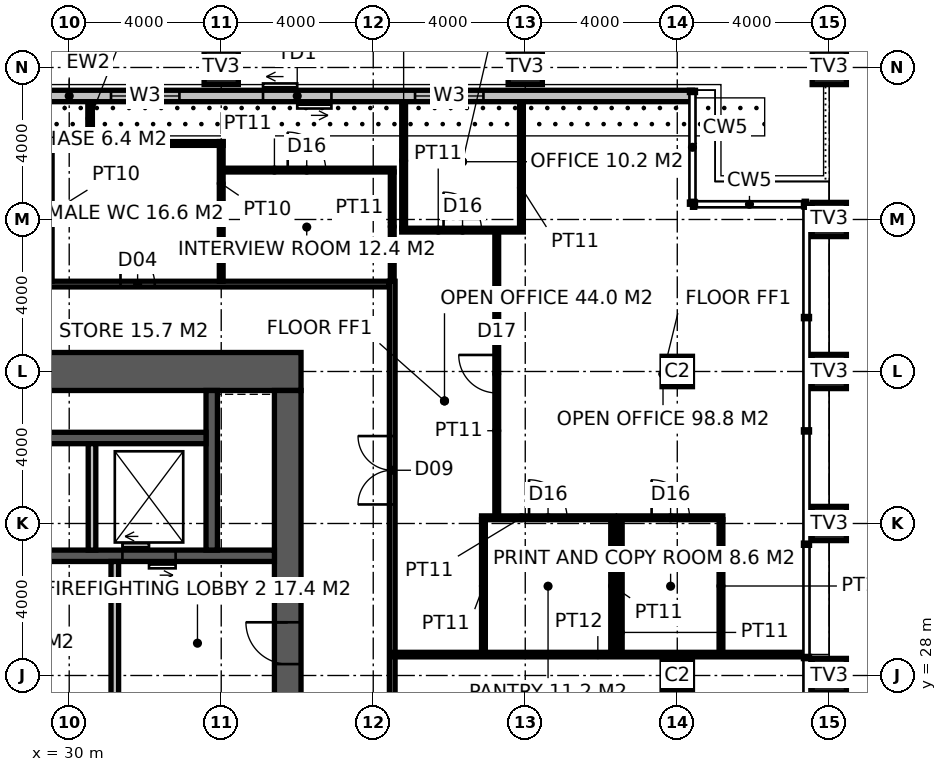
"""IFC4 building model, lengths in metres.
Left out: names, types, materials, properties, quantities, classifications, styles, units other than length and angle.
Written with IfcOpenShell. Run it as: python <this file> out.ifc"""

import sys

from ifc_helpers import new_model, si_unit, direction, frame, frame_2d, origin, origin_2d, place, context, subcontext, project, spatial, rectangle, hollow_rectangle, extrude, element, fill, save


model = new_model("IFC4")
c1 = context("Model", 3, precision=1e-05, world=origin(), true_north=direction((0.0, 1.0)))
c2 = subcontext(c1, "Body", "Model", "MODEL_VIEW")
j1 = project(units=[si_unit("LENGTHUNIT", "METRE"), si_unit("PLANEANGLEUNIT", "RADIAN")], contexts=[c1])
p1 = place(None, origin())
s1 = spatial("IfcSite", under=j1, at=p1, CompositionType="ELEMENT")
p2 = place(p1, origin())
s2 = spatial("IfcBuilding", under=s1, at=p2, CompositionType="ELEMENT")
p3 = place(p2, frame((0.0, 0.0, 238.2)))
s3 = spatial("IfcBuildingStorey", under=s2, at=p3, CompositionType="ELEMENT", Elevation=238.2)
for number, where, z_axis, x_axis in (
    (1, (34.0, 44.0, 0.0), (0.0, 0.0, 1.0), (1.0, 0.0, 0.0)),
    (2, (42.0, 44.0, 0.0), (0.0, 0.0, 1.0), (1.0, 0.0, 0.0)),
    (3, (50.0, 28.0, 0.0), (0.0, 0.0, 1.0), (1.0, 0.0, 0.0)),
    (4, (50.0, 32.0, 0.0), (0.0, 0.0, 1.0), (1.0, 0.0, 0.0)),
    (5, (50.0, 36.0, 0.0), (0.0, 0.0, 1.0), (1.0, 0.0, 0.0)),
    (6, (50.0, 40.0, 0.0), (0.0, 0.0, 1.0), (1.0, 0.0, 0.0)),
    (7, (50.0, 44.0, 0.0), (0.0, 0.0, 1.0), (1.0, 0.0, 0.0)),
):
    element("IfcColumn", number, at=place(p3, frame(where, z_axis=z_axis, x_axis=x_axis)), inside=s3, PredefinedType="USERDEFINED", context=c2, shape_type="SweptSolid", body=[
        extrude(hollow_rectangle(XDim=0.9, YDim=0.9, WallThickness=0.08, at=origin_2d()), origin(), (0.0, 0.0, 1.0), 4.0),
    ])
for number, where, z_axis, x_axis in (
    (8, (46.0, 28.0, 0.0), (0.0, 0.0, 1.0), (1.0, 0.0, 0.0)),
    (9, (46.0, 36.0, 0.0), (0.0, 0.0, 1.0), (1.0, 0.0, 0.0)),
):
    element("IfcColumn", number, at=place(p3, frame(where, z_axis=z_axis, x_axis=x_axis)), inside=s3, PredefinedType="COLUMN", context=c2, shape_type="SweptSolid", body=[
        extrude(hollow_rectangle(XDim=0.8, YDim=0.8, WallThickness=0.08, at=origin_2d()), origin(), (0.0, 0.0, 1.0), 4.0),
    ])
p4 = place(p3, frame((18.5, 36.0, -0.15), z_axis=(0.0, 0.0, 1.0), x_axis=(1.0, 0.0, 0.0)))
e10 = element("IfcWall", 10, at=p4, inside=s3, PredefinedType="SHEAR", context=c2, shape_type="SweptSolid", body=[
    extrude(rectangle(XDim=17.6, YDim=1.0, at=frame_2d((8.8, 0.0))), origin(), (0.0, 0.0, 1.0), 4.0),
])
p5 = place(p3, frame((35.75, 18.5, -0.15), z_axis=(0.0, 0.0, 1.0), x_axis=(0.0, 1.0, 0.0)))
e11 = element("IfcWall", 11, at=p5, inside=s3, PredefinedType="SHEAR", context=c2, shape_type="SweptSolid", body=[
    extrude(rectangle(XDim=17.0, YDim=0.7, at=frame_2d((8.5, 0.0))), origin(), (0.0, 0.0, 1.0), 4.0),
])
p6 = place(p5, frame((9.8, 0.0, 0.15)))
e12 = element("IfcOpeningElement", 12, at=p6, cuts=e11, PredefinedType="OPENING", context=c2, shape_type="SweptSolid", body=[
    extrude(rectangle(XDim=1.1, YDim=2.2, at=frame_2d((0.55, 1.1))), frame((0.0, 0.36, 0.0), z_axis=(0.0, -1.0, 0.0), x_axis=(1.0, 0.0, 0.0)), (0.0, 0.0, 1.0), 0.72),
])
p7 = place(p3, frame((24.15, 31.15, -0.15), z_axis=(0.0, 0.0, 1.0), x_axis=(1.0, 0.0, 0.0)))
e13 = element("IfcWall", 13, at=p7, inside=s3, PredefinedType="SHEAR", context=c2, shape_type="SweptSolid", body=[
    extrude(rectangle(XDim=11.25, YDim=0.3, at=frame_2d((5.625, 0.0))), origin(), (0.0, 0.0, 1.0), 4.0),
])
p8 = place(p7, frame((3.15, 0.0, 0.15)))
e14 = element("IfcOpeningElement", 14, at=p8, cuts=e13, PredefinedType="OPENING", context=c2, shape_type="SweptSolid", body=[
    extrude(rectangle(XDim=1.0, YDim=2.2, at=frame_2d((0.5, 1.1))), frame((0.0, 0.16, 0.0), z_axis=(0.0, -1.0, 0.0), x_axis=(1.0, 0.0, 0.0)), (0.0, 0.0, 1.0), 0.32),
])
p9 = place(p7, frame((7.25, 0.0, 0.15)))
e15 = element("IfcOpeningElement", 15, at=p9, cuts=e13, PredefinedType="OPENING", context=c2, shape_type="SweptSolid", body=[
    extrude(rectangle(XDim=1.4, YDim=2.4, at=frame_2d((0.7, 1.2))), frame((0.0, 0.16, 0.0), z_axis=(0.0, -1.0, 0.0), x_axis=(1.0, 0.0, 0.0)), (0.0, 0.0, 1.0), 0.32),
])
p10 = place(p3, frame((33.75, 31.3, -0.15), z_axis=(0.0, 0.0, 1.0), x_axis=(0.0, 1.0, 0.0)))
e16 = element("IfcWall", 16, at=p10, inside=s3, PredefinedType="SHEAR", context=c2, shape_type="SweptSolid", body=[
    extrude(rectangle(XDim=4.2, YDim=0.3, at=frame_2d((2.1, 0.0))), origin(), (0.0, 0.0, 1.0), 4.0),
])
p11 = place(p3, frame((25.0, 34.25, -0.15), z_axis=(0.0, 0.0, 1.0), x_axis=(1.0, 0.0, 0.0)))
e17 = element("IfcWall", 17, at=p11, inside=s3, PredefinedType="SHEAR", context=c2, shape_type="SweptSolid", body=[
    extrude(rectangle(XDim=8.6, YDim=0.3, at=frame_2d((4.3, 0.0))), origin(), (0.0, 0.0, 1.0), 4.0),
])
p12 = place(p3, frame((30.6, 31.3, -0.15), z_axis=(0.0, 0.0, 1.0), x_axis=(0.0, 1.0, 0.0)))
e18 = element("IfcWall", 18, at=p12, inside=s3, PredefinedType="SOLIDWALL", context=c2, shape_type="SweptSolid", body=[
    extrude(rectangle(XDim=2.8, YDim=0.2, at=frame_2d((1.4, 0.0))), origin(), (0.0, 0.0, 1.0), 4.0),
])
p13 = place(p3, frame((31.2, 26.7, 0.0), z_axis=(0.0, 0.0, 1.0), x_axis=(0.0, 1.0, 0.0)))
e19 = element("IfcWall", 19, at=p13, inside=s3, PredefinedType="SOLIDWALL", context=c2, shape_type="SweptSolid", body=[
    extrude(rectangle(XDim=4.3, YDim=0.2, at=frame_2d((2.15, 0.0))), origin(), (0.0, 0.0, 1.0), 3.85),
])
p14 = place(p3, frame((38.5, 15.025, 0.0), z_axis=(0.0, 0.0, 1.0), x_axis=(0.0, 1.0, 0.0)))
e20 = element("IfcWall", 20, at=p14, inside=s3, PredefinedType="PARTITIONING", context=c2, shape_type="SweptSolid", body=[
    extrude(rectangle(XDim=23.35, YDim=0.15, at=frame_2d((11.675, 0.0))), origin(), (0.0, 0.0, 1.0), 2.65),
])
p15 = place(p14, frame((3.374, 0.0, 0.0)))
e21 = element("IfcOpeningElement", 21, at=p15, cuts=e20, PredefinedType="OPENING", context=c2, shape_type="SweptSolid", body=[
    extrude(rectangle(XDim=1.8, YDim=2.4, at=frame_2d((0.9, 1.2))), frame((0.0, 0.085, 0.0), z_axis=(0.0, -1.0, 0.0), x_axis=(1.0, 0.0, 0.0)), (0.0, 0.0, 1.0), 0.17),
])
p16 = place(p14, frame((17.476, 0.0, 0.0)))
e22 = element("IfcOpeningElement", 22, at=p16, cuts=e20, PredefinedType="OPENING", context=c2, shape_type="SweptSolid", body=[
    extrude(rectangle(XDim=1.8, YDim=2.4, at=frame_2d((0.9, 1.2))), frame((0.0, 0.085, 0.0), z_axis=(0.0, -1.0, 0.0), x_axis=(1.0, 0.0, 0.0)), (0.0, 0.0, 1.0), 0.17),
])
p17 = place(p14, frame((10.475, 0.0, 0.0)))
e23 = element("IfcOpeningElement", 23, at=p17, cuts=e20, PredefinedType="OPENING", context=c2, shape_type="SweptSolid", body=[
    extrude(rectangle(XDim=1.0, YDim=2.2, at=frame_2d((0.5, 1.1))), frame((0.0, 0.085, 0.0), z_axis=(0.0, -1.0, 0.0), x_axis=(1.0, 0.0, 0.0)), (0.0, 0.0, 1.0), 0.17),
])
p18 = place(p3, frame((15.775, 38.3, 0.0), z_axis=(0.0, 0.0, 1.0), x_axis=(1.0, 0.0, 0.0)))
e24 = element("IfcWall", 24, at=p18, inside=s3, PredefinedType="PARTITIONING", context=c2, shape_type="SweptSolid", body=[
    extrude(rectangle(XDim=22.65, YDim=0.15, at=frame_2d((11.325, 0.0))), origin(), (0.0, 0.0, 1.0), 3.85),
])
p19 = place(p18, frame((7.975, 0.0, 0.0)))
e25 = element("IfcOpeningElement", 25, at=p19, cuts=e24, PredefinedType="OPENING", context=c2, shape_type="SweptSolid", body=[
    extrude(rectangle(XDim=0.9, YDim=2.1, at=frame_2d((0.45, 1.05))), frame((0.0, 0.085, 0.0), z_axis=(0.0, -1.0, 0.0), x_axis=(1.0, 0.0, 0.0)), (0.0, 0.0, 1.0), 0.17),
])
p20 = place(p18, frame((11.725, 0.0, 0.0)))
e26 = element("IfcOpeningElement", 26, at=p20, cuts=e24, PredefinedType="OPENING", context=c2, shape_type="SweptSolid", body=[
    extrude(rectangle(XDim=1.0, YDim=2.1, at=frame_2d((0.5, 1.05))), frame((0.0, 0.085, 0.0), z_axis=(0.0, -1.0, 0.0), x_axis=(1.0, 0.0, 0.0)), (0.0, 0.0, 1.0), 0.17),
])
p21 = place(p18, frame((15.575, 0.0, 0.0)))
e27 = element("IfcOpeningElement", 27, at=p21, cuts=e24, PredefinedType="OPENING", context=c2, shape_type="SweptSolid", body=[
    extrude(rectangle(XDim=0.9, YDim=2.1, at=frame_2d((0.45, 1.05))), frame((0.0, 0.085, 0.0), z_axis=(0.0, -1.0, 0.0), x_axis=(1.0, 0.0, 0.0)), (0.0, 0.0, 1.0), 0.17),
])
p22 = place(p3, frame((34.0, 38.375, 0.0), z_axis=(0.0, 0.0, 1.0), x_axis=(0.0, 1.0, 0.0)))
e28 = element("IfcWall", 28, at=p22, inside=s3, PredefinedType="PARTITIONING", context=c2, shape_type="SweptSolid", body=[
    extrude(rectangle(XDim=3.675, YDim=0.1, at=frame_2d((1.837, 0.0))), origin(), (0.0, 0.0, 1.0), 2.65),
])
p23 = place(p3, frame((21.95, 42.0, 0.0), z_axis=(0.0, 0.0, 1.0), x_axis=(1.0, 0.0, 0.0)))
e29 = element("IfcWall", 29, at=p23, inside=s3, PredefinedType="PARTITIONING", context=c2, shape_type="SweptSolid", body=[
    extrude(rectangle(XDim=12.1, YDim=0.1, at=frame_2d((6.05, 0.0))), origin(), (0.0, 0.0, 1.0), 3.85),
])
p24 = place(p3, frame((38.5, 28.55, 0.0), z_axis=(0.0, 0.0, 1.0), x_axis=(1.0, 0.0, 0.0)))
e30 = element("IfcWall", 30, at=p24, inside=s3, PredefinedType="PARTITIONING", context=c2, shape_type="SweptSolid", body=[
    extrude(rectangle(XDim=10.82, YDim=0.12, at=frame_2d((5.41, 0.0))), origin(), (0.0, 0.0, 1.0), 2.65),
])
p25 = place(p3, frame((30.55, 42.0, 0.0), z_axis=(0.0, 0.0, 1.0), x_axis=(0.0, 1.0, 0.0)))
e31 = element("IfcWall", 31, at=p25, inside=s3, PredefinedType="PARTITIONING", context=c2, shape_type="SweptSolid", body=[
    extrude(rectangle(XDim=1.32, YDim=0.12, at=frame_2d((0.66, 0.0))), origin(), (0.0, 0.0, 1.0), 2.65),
])
p26 = place(p3, frame((40.85, 32.15, 0.0), z_axis=(0.0, 0.0, 1.0), x_axis=(1.0, 0.0, 0.0)))
e32 = element("IfcWall", 32, at=p26, inside=s3, PredefinedType="PARTITIONING", context=c2, shape_type="SweptSolid", body=[
    extrude(rectangle(XDim=3.5, YDim=0.1, at=frame_2d((1.75, 0.0))), origin(), (0.0, 0.0, 1.0), 2.95),
])
p27 = place(p26, frame((1.25, 0.0, 0.0)))
e33 = element("IfcOpeningElement", 33, at=p27, cuts=e32, PredefinedType="OPENING", context=c2, shape_type="SweptSolid", body=[
    extrude(rectangle(XDim=1.0, YDim=2.2, at=frame_2d((0.5, 1.1))), frame((0.0, 0.06, 0.0), z_axis=(0.0, -1.0, 0.0), x_axis=(1.0, 0.0, 0.0)), (0.0, 0.0, 1.0), 0.12),
])
p28 = place(p3, frame((44.45, 32.15, 0.0), z_axis=(0.0, 0.0, 1.0), x_axis=(1.0, 0.0, 0.0)))
e34 = element("IfcWall", 34, at=p28, inside=s3, PredefinedType="PARTITIONING", context=c2, shape_type="SweptSolid", body=[
    extrude(rectangle(XDim=2.75, YDim=0.1, at=frame_2d((1.375, 0.0))), origin(), (0.0, 0.0, 1.0), 2.95),
])
p29 = place(p28, frame((0.875, 0.0, 0.0)))
e35 = element("IfcOpeningElement", 35, at=p29, cuts=e34, PredefinedType="OPENING", context=c2, shape_type="SweptSolid", body=[
    extrude(rectangle(XDim=1.0, YDim=2.2, at=frame_2d((0.5, 1.1))), frame((0.0, 0.06, 0.0), z_axis=(0.0, -1.0, 0.0), x_axis=(1.0, 0.0, 0.0)), (0.0, 0.0, 1.0), 0.12),
])
p30 = place(p3, frame((38.75, 39.72, 0.0), z_axis=(0.0, 0.0, 1.0), x_axis=(1.0, 0.0, 0.0)))
e36 = element("IfcWall", 36, at=p30, inside=s3, PredefinedType="PARTITIONING", context=c2, shape_type="SweptSolid", body=[
    extrude(rectangle(XDim=3.2, YDim=0.1, at=frame_2d((1.6, 0.0))), origin(), (0.0, 0.0, 1.0), 3.85),
])
p31 = place(p30, frame((1.1, 0.0, 0.0)))
e37 = element("IfcOpeningElement", 37, at=p31, cuts=e36, PredefinedType="OPENING", context=c2, shape_type="SweptSolid", body=[
    extrude(rectangle(XDim=1.0, YDim=2.2, at=frame_2d((0.5, 1.1))), frame((0.0, 0.06, 0.0), z_axis=(0.0, -1.0, 0.0), x_axis=(1.0, 0.0, 0.0)), (0.0, 0.0, 1.0), 0.12),
])
p32 = place(p3, frame((34.05, 41.3, 0.0), z_axis=(0.0, 0.0, 1.0), x_axis=(1.0, 0.0, 0.0)))
e38 = element("IfcWall", 38, at=p32, inside=s3, PredefinedType="PARTITIONING", context=c2, shape_type="SweptSolid", body=[
    extrude(rectangle(XDim=4.5, YDim=0.1, at=frame_2d((2.25, 0.0))), origin(), (0.0, 0.0, 1.0), 3.85),
])
p33 = place(p32, frame((1.7, 0.0, 0.0)))
e39 = element("IfcOpeningElement", 39, at=p33, cuts=e38, PredefinedType="OPENING", context=c2, shape_type="SweptSolid", body=[
    extrude(rectangle(XDim=1.0, YDim=2.2, at=frame_2d((0.5, 1.1))), frame((0.0, 0.06, 0.0), z_axis=(0.0, -1.0, 0.0), x_axis=(1.0, 0.0, 0.0)), (0.0, 0.0, 1.0), 0.12),
])
p34 = place(p3, frame((38.5, 38.375, 0.0), z_axis=(0.0, 0.0, 1.0), x_axis=(0.0, 1.0, 0.0)))
e40 = element("IfcWall", 40, at=p34, inside=s3, PredefinedType="PARTITIONING", context=c2, shape_type="SweptSolid", body=[
    extrude(rectangle(XDim=2.875, YDim=0.1, at=frame_2d((1.438, 0.0))), origin(), (0.0, 0.0, 1.0), 2.65),
])
p35 = place(p3, frame((38.8, 39.77, 0.0), z_axis=(0.0, 0.0, 1.0), x_axis=(0.0, 1.0, 0.0)))
e41 = element("IfcWall", 41, at=p35, inside=s3, PredefinedType="PARTITIONING", context=c2, shape_type="SweptSolid", body=[
    extrude(rectangle(XDim=3.55, YDim=0.1, at=frame_2d((1.775, 0.0))), origin(), (0.0, 0.0, 1.0), 3.85),
])
p36 = place(p3, frame((40.9, 28.61, 0.0), z_axis=(0.0, 0.0, 1.0), x_axis=(0.0, 1.0, 0.0)))
e42 = element("IfcWall", 42, at=p36, inside=s3, PredefinedType="PARTITIONING", context=c2, shape_type="SweptSolid", body=[
    extrude(rectangle(XDim=3.49, YDim=0.1, at=frame_2d((1.745, 0.0))), origin(), (0.0, 0.0, 1.0), 3.85),
])
p37 = place(p3, frame((41.9, 39.77, 0.0), z_axis=(0.0, 0.0, 1.0), x_axis=(0.0, 1.0, 0.0)))
e43 = element("IfcWall", 43, at=p37, inside=s3, PredefinedType="PARTITIONING", context=c2, shape_type="SweptSolid", body=[
    extrude(rectangle(XDim=3.55, YDim=0.1, at=frame_2d((1.775, 0.0))), origin(), (0.0, 0.0, 1.0), 2.65),
])
for number, where, z_axis, x_axis in (
    (44, (44.3, 28.61, 0.0), (0.0, 0.0, 1.0), (0.0, 1.0, 0.0)),
    (45, (44.5, 28.61, 0.0), (0.0, 0.0, 1.0), (0.0, 1.0, 0.0)),
    (46, (47.15, 28.61, 0.0), (0.0, 0.0, 1.0), (0.0, 1.0, 0.0)),
):
    element("IfcWall", number, at=place(p3, frame(where, z_axis=z_axis, x_axis=x_axis)), inside=s3, PredefinedType="PARTITIONING", context=c2, shape_type="SweptSolid", body=[
        extrude(rectangle(XDim=3.49, YDim=0.1, at=frame_2d((1.745, 0.0))), origin(), (0.0, 0.0, 1.0), 3.85),
    ])
p38 = place(p3, frame((41.25, 32.2, 0.0), z_axis=(0.0, 0.0, 1.0), x_axis=(0.0, 1.0, 0.0)))
e47 = element("IfcWall", 47, at=p38, inside=s3, PredefinedType="PARTITIONING", context=c2, shape_type="SweptSolid", body=[
    extrude(rectangle(XDim=7.47, YDim=0.1, at=frame_2d((3.735, 0.0))), origin(), (0.0, 0.0, 1.0), 3.85),
])
p39 = place(p38, frame((3.235, 0.0, 0.0)))
e48 = element("IfcOpeningElement", 48, at=p39, cuts=e47, PredefinedType="OPENING", context=c2, shape_type="SweptSolid", body=[
    extrude(rectangle(XDim=1.0, YDim=2.2, at=frame_2d((0.5, 1.1))), frame((0.0, 0.06, 0.0), z_axis=(0.0, -1.0, 0.0), x_axis=(1.0, 0.0, 0.0)), (0.0, 0.0, 1.0), 0.12),
])
p40 = place(p3, frame((46.4, 43.25, 0.0), z_axis=(0.0, 0.0, 1.0), x_axis=(-1.0, 0.0, 0.0)))
e49 = element("IfcWall", 49, at=p40, inside=s3, PredefinedType="ELEMENTEDWALL", context=c2, shape_type="SweptSolid", body=[
    extrude(rectangle(XDim=32.8, YDim=0.3, at=frame_2d((16.4, 0.0))), origin(), (0.0, 0.0, 1.0), 3.85),
])
p41 = place(p40, frame((25.5, 0.0, 0.8)))
e50 = element("IfcOpeningElement", 50, at=p41, cuts=e49, PredefinedType="OPENING", context=c2, shape_type="SweptSolid", body=[
    extrude(rectangle(XDim=1.8, YDim=2.4, at=frame_2d((0.9, 1.2))), frame((0.0, 0.16, 0.0), z_axis=(0.0, -1.0, 0.0), x_axis=(1.0, 0.0, 0.0)), (0.0, 0.0, 1.0), 0.32),
])
p42 = place(p40, frame((21.5, 0.0, 0.8)))
e51 = element("IfcOpeningElement", 51, at=p42, cuts=e49, PredefinedType="OPENING", context=c2, shape_type="SweptSolid", body=[
    extrude(rectangle(XDim=1.8, YDim=2.4, at=frame_2d((0.9, 1.2))), frame((0.0, 0.16, 0.0), z_axis=(0.0, -1.0, 0.0), x_axis=(1.0, 0.0, 0.0)), (0.0, 0.0, 1.0), 0.32),
])
p43 = place(p40, frame((18.6, 0.0, 0.8)))
e52 = element("IfcOpeningElement", 52, at=p43, cuts=e49, PredefinedType="OPENING", context=c2, shape_type="SweptSolid", body=[
    extrude(rectangle(XDim=1.0, YDim=2.4, at=frame_2d((0.5, 1.2))), frame((0.0, 0.16, 0.0), z_axis=(0.0, -1.0, 0.0), x_axis=(1.0, 0.0, 0.0)), (0.0, 0.0, 1.0), 0.32),
])
p44 = place(p40, frame((17.2, 0.0, 0.8)))
e53 = element("IfcOpeningElement", 53, at=p44, cuts=e49, PredefinedType="OPENING", context=c2, shape_type="SweptSolid", body=[
    extrude(rectangle(XDim=1.0, YDim=2.4, at=frame_2d((0.5, 1.2))), frame((0.0, 0.16, 0.0), z_axis=(0.0, -1.0, 0.0), x_axis=(1.0, 0.0, 0.0)), (0.0, 0.0, 1.0), 0.32),
])
p45 = place(p40, frame((13.5, 0.0, 0.8)))
e54 = element("IfcOpeningElement", 54, at=p45, cuts=e49, PredefinedType="OPENING", context=c2, shape_type="SweptSolid", body=[
    extrude(rectangle(XDim=1.8, YDim=2.4, at=frame_2d((0.9, 1.2))), frame((0.0, 0.16, 0.0), z_axis=(0.0, -1.0, 0.0), x_axis=(1.0, 0.0, 0.0)), (0.0, 0.0, 1.0), 0.32),
])
p46 = place(p40, frame((9.5, 0.0, 0.0)))
e55 = element("IfcOpeningElement", 55, at=p46, cuts=e49, PredefinedType="OPENING", context=c2, shape_type="SweptSolid", body=[
    extrude(rectangle(XDim=1.8, YDim=2.4, at=frame_2d((0.9, 1.2))), frame((0.0, 0.16, 0.0), z_axis=(0.0, -1.0, 0.0), x_axis=(1.0, 0.0, 0.0)), (0.0, 0.0, 1.0), 0.32),
])
p47 = place(p40, frame((5.5, 0.0, 0.8)))
e56 = element("IfcOpeningElement", 56, at=p47, cuts=e49, PredefinedType="OPENING", context=c2, shape_type="SweptSolid", body=[
    extrude(rectangle(XDim=1.8, YDim=2.4, at=frame_2d((0.9, 1.2))), frame((0.0, 0.16, 0.0), z_axis=(0.0, -1.0, 0.0), x_axis=(1.0, 0.0, 0.0)), (0.0, 0.0, 1.0), 0.32),
])
p48 = place(p6, origin())
e57 = element("IfcDoor", 57, at=p48, inside=s3, OperationType="SINGLE_SWING_RIGHT", PredefinedType="DOOR", context=c2, shape_type="SweptSolid", body=[
    extrude(rectangle(XDim=1.1, YDim=2.2, at=frame_2d((0.55, 1.1))), frame((0.0, 0.025, 0.0), z_axis=(0.0, -1.0, 0.0), x_axis=(1.0, 0.0, 0.0)), (0.0, 0.0, 1.0), 0.05),
])
fill(e12, e57)
p49 = place(p21, origin())
e58 = element("IfcDoor", 58, at=p49, inside=s3, OperationType="SINGLE_SWING_LEFT", PredefinedType="DOOR", context=c2, shape_type="SweptSolid", body=[
    extrude(rectangle(XDim=0.9, YDim=2.1, at=frame_2d((0.45, 1.05))), frame((0.0, 0.025, 0.0), z_axis=(0.0, -1.0, 0.0), x_axis=(1.0, 0.0, 0.0)), (0.0, 0.0, 1.0), 0.05),
])
fill(e27, e58)
p50 = place(p16, origin())
e59 = element("IfcDoor", 59, at=p50, inside=s3, OperationType="DOUBLE_DOOR_DOUBLE_SWING", PredefinedType="DOOR", context=c2, shape_type="SweptSolid", body=[
    extrude(rectangle(XDim=1.8, YDim=2.4, at=frame_2d((0.9, 1.2))), frame((0.0, 0.025, 0.0), z_axis=(0.0, -1.0, 0.0), x_axis=(1.0, 0.0, 0.0)), (0.0, 0.0, 1.0), 0.05),
])
fill(e22, e59)
p51 = place(p33, origin())
e60 = element("IfcDoor", 60, at=p51, inside=s3, OperationType="SINGLE_SWING_LEFT", PredefinedType="DOOR", context=c2, shape_type="SweptSolid", body=[
    extrude(rectangle(XDim=1.0, YDim=2.2, at=frame_2d((0.5, 1.1))), frame((0.0, 0.025, 0.0), z_axis=(0.0, -1.0, 0.0), x_axis=(1.0, 0.0, 0.0)), (0.0, 0.0, 1.0), 0.05),
])
fill(e39, e60)
p52 = place(p27, origin())
e61 = element("IfcDoor", 61, at=p52, inside=s3, OperationType="SINGLE_SWING_LEFT", PredefinedType="DOOR", context=c2, shape_type="SweptSolid", body=[
    extrude(rectangle(XDim=1.0, YDim=2.2, at=frame_2d((0.5, 1.1))), frame((0.0, 0.025, 0.0), z_axis=(0.0, -1.0, 0.0), x_axis=(1.0, 0.0, 0.0)), (0.0, 0.0, 1.0), 0.05),
])
fill(e33, e61)
p53 = place(p29, origin())
e62 = element("IfcDoor", 62, at=p53, inside=s3, OperationType="SINGLE_SWING_LEFT", PredefinedType="DOOR", context=c2, shape_type="SweptSolid", body=[
    extrude(rectangle(XDim=1.0, YDim=2.2, at=frame_2d((0.5, 1.1))), frame((0.0, 0.025, 0.0), z_axis=(0.0, -1.0, 0.0), x_axis=(1.0, 0.0, 0.0)), (0.0, 0.0, 1.0), 0.05),
])
fill(e35, e62)
p54 = place(p31, origin())
e63 = element("IfcDoor", 63, at=p54, inside=s3, OperationType="SINGLE_SWING_LEFT", PredefinedType="DOOR", context=c2, shape_type="SweptSolid", body=[
    extrude(rectangle(XDim=1.0, YDim=2.2, at=frame_2d((0.5, 1.1))), frame((0.0, 0.025, 0.0), z_axis=(0.0, -1.0, 0.0), x_axis=(1.0, 0.0, 0.0)), (0.0, 0.0, 1.0), 0.05),
])
fill(e37, e63)
p55 = place(p39, origin())
e64 = element("IfcDoor", 64, at=p55, inside=s3, OperationType="SINGLE_SWING_RIGHT", PredefinedType="DOOR", context=c2, shape_type="SweptSolid", body=[
    extrude(rectangle(XDim=1.0, YDim=2.2, at=frame_2d((0.5, 1.1))), frame((0.0, 0.025, 0.0), z_axis=(0.0, -1.0, 0.0), x_axis=(1.0, 0.0, 0.0)), (0.0, 0.0, 1.0), 0.05),
])
fill(e48, e64)
p56 = place(p9, origin())
e65 = element("IfcDoor", 65, at=p56, inside=s3, OperationType="DOUBLE_DOOR_SLIDING", PredefinedType="DOOR", context=c2, shape_type="SweptSolid", body=[
    extrude(rectangle(XDim=1.4, YDim=2.4, at=frame_2d((0.7, 1.2))), frame((0.0, 0.025, 0.0), z_axis=(0.0, -1.0, 0.0), x_axis=(1.0, 0.0, 0.0)), (0.0, 0.0, 1.0), 0.05),
])
fill(e15, e65)
p57 = place(p45, origin())
e66 = element("IfcWindow", 66, at=p57, inside=s3, PartitioningType="SINGLE_PANEL", PredefinedType="WINDOW", context=c2, shape_type="SweptSolid", body=[
    extrude(rectangle(XDim=1.8, YDim=2.4, at=frame_2d((0.9, 1.2))), frame((0.0, 0.03, 0.0), z_axis=(0.0, -1.0, 0.0), x_axis=(1.0, 0.0, 0.0)), (0.0, 0.0, 1.0), 0.06),
])
fill(e54, e66)
p58 = place(p46, origin())
e67 = element("IfcDoor", 67, at=p58, inside=s3, OperationType="DOUBLE_DOOR_SLIDING", PredefinedType="DOOR", context=c2, shape_type="SweptSolid", body=[
    extrude(rectangle(XDim=1.8, YDim=2.4, at=frame_2d((0.9, 1.2))), frame((0.0, 0.025, 0.0), z_axis=(0.0, -1.0, 0.0), x_axis=(1.0, 0.0, 0.0)), (0.0, 0.0, 1.0), 0.05),
])
fill(e55, e67)
p59 = place(p47, origin())
e68 = element("IfcWindow", 68, at=p59, inside=s3, PartitioningType="SINGLE_PANEL", PredefinedType="WINDOW", context=c2, shape_type="SweptSolid", body=[
    extrude(rectangle(XDim=1.8, YDim=2.4, at=frame_2d((0.9, 1.2))), frame((0.0, 0.03, 0.0), z_axis=(0.0, -1.0, 0.0), x_axis=(1.0, 0.0, 0.0)), (0.0, 0.0, 1.0), 0.06),
])
fill(e56, e68)
save(model, sys.argv[1])
